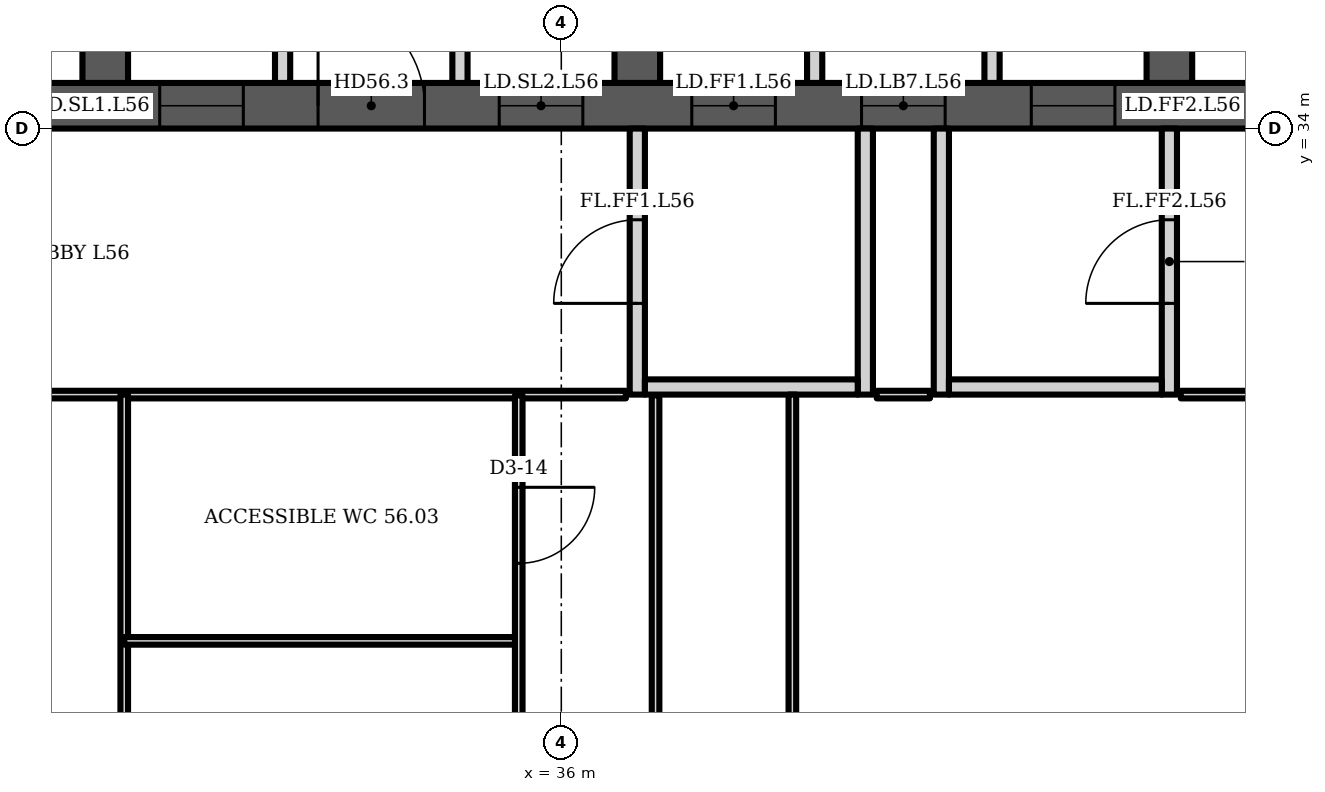
"""IFC4 building model, lengths in metres.
Left out: names, types, materials, properties, quantities, classifications, styles, units other than length and angle.
Written with IfcOpenShell. Run it as: python <this file> out.ifc"""

import sys

from ifc_helpers import new_model, si_unit, direction, frame, frame_2d, origin, place, context, subcontext, project, spatial, polyline, rectangle, outline, extrude, element, fill, save


model = new_model("IFC4")
c1 = context("Model", 3, precision=1e-05, world=origin(), true_north=direction((0.0, 1.0)))
c2 = subcontext(c1, "Body", "Model", "MODEL_VIEW")
j1 = project(units=[si_unit("LENGTHUNIT", "METRE"), si_unit("PLANEANGLEUNIT", "RADIAN")], contexts=[c1])
p1 = place(None, origin())
s1 = spatial("IfcSite", under=j1, at=p1, CompositionType="ELEMENT")
p2 = place(p1, origin())
s2 = spatial("IfcBuilding", under=s1, at=p2, CompositionType="ELEMENT")
p3 = place(p2, frame((0.0, 0.0, 225.1)))
s3 = spatial("IfcBuildingStorey", under=s2, at=p3, CompositionType="ELEMENT", Elevation=225.1)
p4 = place(p3, frame((23.0, 34.3, 0.0), z_axis=(0.0, 0.0, 1.0), x_axis=(1.0, 0.0, 0.0)))
e1 = element("IfcWall", 1, at=p4, inside=s3, PredefinedType="SHEAR", context=c2, shape_type="SweptSolid", body=[
    extrude(rectangle(XDim=35.0, YDim=0.6, at=frame_2d((17.5, 0.0))), origin(), (0.0, 0.0, 1.0), 3.6),
])
p5 = place(p4, frame((0.65, 0.0, 0.0)))
e2 = element("IfcOpeningElement", 2, at=p5, cuts=e1, PredefinedType="OPENING", context=c2, shape_type="SweptSolid", body=[
    extrude(rectangle(XDim=1.2, YDim=2.1, at=frame_2d((0.6, 1.05))), frame((0.0, 0.31, 0.0), z_axis=(0.0, -1.0, 0.0), x_axis=(1.0, 0.0, 0.0)), (0.0, 0.0, 1.0), 0.62),
])
p6 = place(p4, frame((7.717, 0.0, 0.0)))
e3 = element("IfcOpeningElement", 3, at=p6, cuts=e1, PredefinedType="OPENING", context=c2, shape_type="SweptSolid", body=[
    extrude(rectangle(XDim=1.1, YDim=2.1, at=frame_2d((0.55, 1.05))), frame((0.0, 0.31, 0.0), z_axis=(0.0, -1.0, 0.0), x_axis=(1.0, 0.0, 0.0)), (0.0, 0.0, 1.0), 0.62),
])
p7 = place(p4, frame((12.183, 0.0, 0.0)))
e4 = element("IfcOpeningElement", 4, at=p7, cuts=e1, PredefinedType="OPENING", context=c2, shape_type="SweptSolid", body=[
    extrude(rectangle(XDim=1.1, YDim=2.1, at=frame_2d((0.55, 1.05))), frame((0.0, 0.31, 0.0), z_axis=(0.0, -1.0, 0.0), x_axis=(1.0, 0.0, 0.0)), (0.0, 0.0, 1.0), 0.62),
])
p8 = place(p4, frame((9.8, 0.0, 0.0)))
e5 = element("IfcOpeningElement", 5, at=p8, cuts=e1, PredefinedType="OPENING", context=c2, shape_type="SweptSolid", body=[
    extrude(rectangle(XDim=1.4, YDim=2.1, at=frame_2d((0.7, 1.05))), frame((0.0, 0.31, 0.0), z_axis=(0.0, -1.0, 0.0), x_axis=(1.0, 0.0, 0.0)), (0.0, 0.0, 1.0), 0.62),
])
p9 = place(p4, frame((14.717, 0.0, 0.0)))
e6 = element("IfcOpeningElement", 6, at=p9, cuts=e1, PredefinedType="OPENING", context=c2, shape_type="SweptSolid", body=[
    extrude(rectangle(XDim=1.1, YDim=2.1, at=frame_2d((0.55, 1.05))), frame((0.0, 0.31, 0.0), z_axis=(0.0, -1.0, 0.0), x_axis=(1.0, 0.0, 0.0)), (0.0, 0.0, 1.0), 0.62),
])
p10 = place(p4, frame((16.95, 0.0, 0.0)))
e7 = element("IfcOpeningElement", 7, at=p10, cuts=e1, PredefinedType="OPENING", context=c2, shape_type="SweptSolid", body=[
    extrude(rectangle(XDim=1.1, YDim=2.1, at=frame_2d((0.55, 1.05))), frame((0.0, 0.31, 0.0), z_axis=(0.0, -1.0, 0.0), x_axis=(1.0, 0.0, 0.0)), (0.0, 0.0, 1.0), 0.62),
])
p11 = place(p4, frame((19.183, 0.0, 0.0)))
e8 = element("IfcOpeningElement", 8, at=p11, cuts=e1, PredefinedType="OPENING", context=c2, shape_type="SweptSolid", body=[
    extrude(rectangle(XDim=1.1, YDim=2.1, at=frame_2d((0.55, 1.05))), frame((0.0, 0.31, 0.0), z_axis=(0.0, -1.0, 0.0), x_axis=(1.0, 0.0, 0.0)), (0.0, 0.0, 1.0), 0.62),
])
p12 = place(p4, frame((26.15, 0.0, 0.0)))
e9 = element("IfcOpeningElement", 9, at=p12, cuts=e1, PredefinedType="OPENING", context=c2, shape_type="SweptSolid", body=[
    extrude(rectangle(XDim=1.2, YDim=2.1, at=frame_2d((0.6, 1.05))), frame((0.0, 0.31, 0.0), z_axis=(0.0, -1.0, 0.0), x_axis=(1.0, 0.0, 0.0)), (0.0, 0.0, 1.0), 0.62),
])
p13 = place(p4, frame((30.8, 0.0, 0.0)))
e10 = element("IfcOpeningElement", 10, at=p13, cuts=e1, PredefinedType="OPENING", context=c2, shape_type="SweptSolid", body=[
    extrude(rectangle(XDim=1.4, YDim=2.1, at=frame_2d((0.7, 1.05))), frame((0.0, 0.31, 0.0), z_axis=(0.0, -1.0, 0.0), x_axis=(1.0, 0.0, 0.0)), (0.0, 0.0, 1.0), 0.62),
])
p14 = place(p3, frame((30.0, 34.6, 0.0), z_axis=(0.0, 0.0, 1.0), x_axis=(0.0, 1.0, 0.0)))
e11 = element("IfcWall", 11, at=p14, inside=s3, PredefinedType="SHEAR", context=c2, shape_type="SweptSolid", body=[
    extrude(rectangle(XDim=14.171, YDim=0.6, at=frame_2d((7.085, 0.0))), origin(), (0.0, 0.0, 1.0), 3.6),
])
p15 = place(p14, frame((3.8, 0.0, 0.0)))
e12 = element("IfcOpeningElement", 12, at=p15, cuts=e11, PredefinedType="OPENING", context=c2, shape_type="SweptSolid", body=[
    extrude(rectangle(XDim=1.1, YDim=2.1, at=frame_2d((0.55, 1.05))), frame((0.0, 0.31, 0.0), z_axis=(0.0, -1.0, 0.0), x_axis=(1.0, 0.0, 0.0)), (0.0, 0.0, 1.0), 0.62),
])
p16 = place(p3, frame((37.0, 34.6, 0.0), z_axis=(0.0, 0.0, 1.0), x_axis=(0.0, 1.0, 0.0)))
e13 = element("IfcWall", 13, at=p16, inside=s3, PredefinedType="SHEAR", context=c2, shape_type="SweptSolid", body=[
    extrude(rectangle(XDim=14.784, YDim=0.6, at=frame_2d((7.392, 0.0))), origin(), (0.0, 0.0, 1.0), 3.6),
])
p17 = place(p16, frame((11.302, 0.0, 0.0)))
e14 = element("IfcOpeningElement", 14, at=p17, cuts=e13, PredefinedType="OPENING", context=c2, shape_type="SweptSolid", body=[
    extrude(rectangle(XDim=1.0, YDim=2.1, at=frame_2d((0.5, 1.05))), frame((0.0, 0.31, 0.0), z_axis=(0.0, -1.0, 0.0), x_axis=(1.0, 0.0, 0.0)), (0.0, 0.0, 1.0), 0.62),
])
p18 = place(p16, frame((3.8, 0.0, 0.0)))
e15 = element("IfcOpeningElement", 15, at=p18, cuts=e13, PredefinedType="OPENING", context=c2, shape_type="SweptSolid", body=[
    extrude(rectangle(XDim=1.1, YDim=2.1, at=frame_2d((0.55, 1.05))), frame((0.0, 0.31, 0.0), z_axis=(0.0, -1.0, 0.0), x_axis=(1.0, 0.0, 0.0)), (0.0, 0.0, 1.0), 0.62),
])
p19 = place(p3, frame((44.0, 34.6, 0.0), z_axis=(0.0, 0.0, 1.0), x_axis=(0.0, 1.0, 0.0)))
e16 = element("IfcWall", 16, at=p19, inside=s3, PredefinedType="SHEAR", context=c2, shape_type="SweptSolid", body=[
    extrude(rectangle(XDim=14.784, YDim=0.6, at=frame_2d((7.392, 0.0))), origin(), (0.0, 0.0, 1.0), 3.6),
])
p20 = place(p19, frame((11.608, 0.0, 0.0)))
e17 = element("IfcOpeningElement", 17, at=p20, cuts=e16, PredefinedType="OPENING", context=c2, shape_type="SweptSolid", body=[
    extrude(rectangle(XDim=1.0, YDim=2.1, at=frame_2d((0.5, 1.05))), frame((0.0, 0.31, 0.0), z_axis=(0.0, -1.0, 0.0), x_axis=(1.0, 0.0, 0.0)), (0.0, 0.0, 1.0), 0.62),
])
p21 = place(p19, frame((3.8, 0.0, 0.0)))
e18 = element("IfcOpeningElement", 18, at=p21, cuts=e16, PredefinedType="OPENING", context=c2, shape_type="SweptSolid", body=[
    extrude(rectangle(XDim=1.1, YDim=2.1, at=frame_2d((0.55, 1.05))), frame((0.0, 0.31, 0.0), z_axis=(0.0, -1.0, 0.0), x_axis=(1.0, 0.0, 0.0)), (0.0, 0.0, 1.0), 0.62),
])
p22 = place(p3, frame((0.0, 0.0, -0.0)))
e19 = element("IfcWall", 19, at=p22, inside=s3, PredefinedType="PARTITIONING", context=c2, shape_type="SweptSolid", body=[
    extrude(outline(polyline([(32.233, 37.45), (30.3, 37.45), (30.3, 37.65), (32.233, 37.65), (32.433, 37.65), (32.433, 34.6), (32.233, 34.6), (32.233, 37.45)])), origin(), (0.0, 0.0, 1.0), 3.2),
])
p23 = place(p3, frame((0.0, 0.0, -0.0)))
e20 = element("IfcWall", 20, at=p23, inside=s3, PredefinedType="PARTITIONING", context=c2, shape_type="SweptSolid", body=[
    extrude(outline(polyline([(34.567, 37.65), (34.767, 37.65), (36.7, 37.65), (36.7, 37.45), (34.767, 37.45), (34.767, 34.6), (34.567, 34.6), (34.567, 37.65)])), origin(), (0.0, 0.0, 1.0), 3.2),
])
p24 = place(p3, frame((0.0, 0.0, -0.0)))
e21 = element("IfcWall", 21, at=p24, inside=s3, PredefinedType="PARTITIONING", context=c2, shape_type="SweptSolid", body=[
    extrude(outline(polyline([(41.567, 37.1), (39.433, 37.1), (39.433, 34.6), (39.233, 34.6), (39.233, 37.45), (37.3, 37.45), (37.3, 37.65), (39.233, 37.65), (39.433, 37.65), (39.433, 37.3), (41.567, 37.3), (41.567, 37.35), (41.767, 37.35), (43.7, 37.35), (43.7, 37.15), (41.767, 37.15), (41.767, 34.6), (41.567, 34.6), (41.567, 37.1)])), origin(), (0.0, 0.0, 1.0), 3.2),
])
p25 = place(p3, frame((37.0, 30.5, 0.0), z_axis=(0.0, 0.0, 1.0), x_axis=(0.0, 1.0, 0.0)))
e22 = element("IfcWall", 22, at=p25, inside=s3, PredefinedType="PARTITIONING", context=c2, shape_type="SweptSolid", body=[
    extrude(rectangle(XDim=3.5, YDim=0.2, at=frame_2d((1.75, 0.0))), origin(), (0.0, 0.0, 1.0), 3.2),
])
p26 = place(p25, frame((1.2, 0.0, 0.0)))
e23 = element("IfcOpeningElement", 23, at=p26, cuts=e22, PredefinedType="OPENING", context=c2, shape_type="SweptSolid", body=[
    extrude(rectangle(XDim=1.1, YDim=2.1, at=frame_2d((0.55, 1.05))), frame((0.0, 0.11, 0.0), z_axis=(0.0, -1.0, 0.0), x_axis=(1.0, 0.0, 0.0)), (0.0, 0.0, 1.0), 0.22),
])
p27 = place(p3, frame((40.0, 30.5, 0.0), z_axis=(0.0, 0.0, 1.0), x_axis=(0.0, 1.0, 0.0)))
e24 = element("IfcWall", 24, at=p27, inside=s3, PredefinedType="PARTITIONING", context=c2, shape_type="SweptSolid", body=[
    extrude(rectangle(XDim=3.5, YDim=0.2, at=frame_2d((1.75, 0.0))), origin(), (0.0, 0.0, 1.0), 3.2),
])
p28 = place(p3, frame((37.1, 30.6, 0.0), z_axis=(0.0, 0.0, 1.0), x_axis=(1.0, 0.0, 0.0)))
e25 = element("IfcWall", 25, at=p28, inside=s3, PredefinedType="PARTITIONING", context=c2, shape_type="SweptSolid", body=[
    extrude(rectangle(XDim=2.8, YDim=0.2, at=frame_2d((1.4, 0.0))), origin(), (0.0, 0.0, 1.0), 3.2),
])
p29 = place(p3, frame((41.0, 30.5, 0.0), z_axis=(0.0, 0.0, 1.0), x_axis=(0.0, 1.0, 0.0)))
e26 = element("IfcWall", 26, at=p29, inside=s3, PredefinedType="PARTITIONING", context=c2, shape_type="SweptSolid", body=[
    extrude(rectangle(XDim=3.5, YDim=0.2, at=frame_2d((1.75, 0.0))), origin(), (0.0, 0.0, 1.0), 3.2),
])
p30 = place(p3, frame((44.0, 30.5, 0.0), z_axis=(0.0, 0.0, 1.0), x_axis=(0.0, 1.0, 0.0)))
e27 = element("IfcWall", 27, at=p30, inside=s3, PredefinedType="PARTITIONING", context=c2, shape_type="SweptSolid", body=[
    extrude(rectangle(XDim=3.5, YDim=0.2, at=frame_2d((1.75, 0.0))), origin(), (0.0, 0.0, 1.0), 3.2),
])
p31 = place(p30, frame((1.2, 0.0, 0.0)))
e28 = element("IfcOpeningElement", 28, at=p31, cuts=e27, PredefinedType="OPENING", context=c2, shape_type="SweptSolid", body=[
    extrude(rectangle(XDim=1.1, YDim=2.1, at=frame_2d((0.55, 1.05))), frame((0.0, 0.11, 0.0), z_axis=(0.0, -1.0, 0.0), x_axis=(1.0, 0.0, 0.0)), (0.0, 0.0, 1.0), 0.22),
])
p32 = place(p3, frame((41.1, 30.6, 0.0), z_axis=(0.0, 0.0, 1.0), x_axis=(1.0, 0.0, 0.0)))
e29 = element("IfcWall", 29, at=p32, inside=s3, PredefinedType="PARTITIONING", context=c2, shape_type="SweptSolid", body=[
    extrude(rectangle(XDim=2.8, YDim=0.2, at=frame_2d((1.4, 0.0))), origin(), (0.0, 0.0, 1.0), 3.2),
])
p33 = place(p3, frame((24.8, 30.5, 0.0), z_axis=(0.0, 0.0, 1.0), x_axis=(1.0, 0.0, 0.0)))
e30 = element("IfcWall", 30, at=p33, inside=s3, PredefinedType="PARTITIONING", context=c2, shape_type="SweptSolid", body=[
    extrude(rectangle(XDim=12.05, YDim=0.1, at=frame_2d((6.025, 0.0))), origin(), (0.0, 0.0, 1.0), 3.2),
])
p34 = place(p3, frame((30.25, 17.0, 0.0), z_axis=(0.0, 0.0, 1.0), x_axis=(0.0, 1.0, 0.0)))
e31 = element("IfcWall", 31, at=p34, inside=s3, PredefinedType="PARTITIONING", context=c2, shape_type="SweptSolid", body=[
    extrude(rectangle(XDim=13.5, YDim=0.1, at=frame_2d((6.75, 0.0))), origin(), (0.0, 0.0, 1.0), 3.2),
])
p35 = place(p3, frame((30.25, 27.26, 0.0), z_axis=(0.0, 0.0, 1.0), x_axis=(1.0, 0.0, 0.0)))
e32 = element("IfcWall", 32, at=p35, inside=s3, PredefinedType="PARTITIONING", context=c2, shape_type="SweptSolid", body=[
    extrude(rectangle(XDim=5.19, YDim=0.1, at=frame_2d((2.595, 0.0))), origin(), (0.0, 0.0, 1.0), 3.2),
])
p36 = place(p3, frame((35.44, 16.995, 0.0), z_axis=(0.0, 0.0, 1.0), x_axis=(0.0, 1.0, 0.0)))
e33 = element("IfcWall", 33, at=p36, inside=s3, PredefinedType="PARTITIONING", context=c2, shape_type="SweptSolid", body=[
    extrude(rectangle(XDim=13.495, YDim=0.1, at=frame_2d((6.748, 0.0))), origin(), (0.0, 0.0, 1.0), 3.2),
])
p37 = place(p36, frame((2.166, 0.0, 0.0)))
e34 = element("IfcOpeningElement", 34, at=p37, cuts=e33, PredefinedType="OPENING", context=c2, shape_type="SweptSolid", body=[
    extrude(rectangle(XDim=0.9, YDim=2.1, at=frame_2d((0.45, 1.05))), frame((0.0, 0.06, 0.0), z_axis=(0.0, -1.0, 0.0), x_axis=(1.0, 0.0, 0.0)), (0.0, 0.0, 1.0), 0.12),
])
p38 = place(p36, frame((7.215, 0.0, 0.0)))
e35 = element("IfcOpeningElement", 35, at=p38, cuts=e33, PredefinedType="OPENING", context=c2, shape_type="SweptSolid", body=[
    extrude(rectangle(XDim=0.9, YDim=2.1, at=frame_2d((0.45, 1.05))), frame((0.0, 0.06, 0.0), z_axis=(0.0, -1.0, 0.0), x_axis=(1.0, 0.0, 0.0)), (0.0, 0.0, 1.0), 0.12),
])
p39 = place(p36, frame((11.285, 0.0, 0.0)))
e36 = element("IfcOpeningElement", 36, at=p39, cuts=e33, PredefinedType="OPENING", context=c2, shape_type="SweptSolid", body=[
    extrude(rectangle(XDim=1.0, YDim=2.1, at=frame_2d((0.5, 1.05))), frame((0.0, 0.06, 0.0), z_axis=(0.0, -1.0, 0.0), x_axis=(1.0, 0.0, 0.0)), (0.0, 0.0, 1.0), 0.12),
])
p40 = place(p3, frame((37.24, 4.587, 0.0), z_axis=(0.0, 0.0, 1.0), x_axis=(0.0, 1.0, 0.0)))
e37 = element("IfcWall", 37, at=p40, inside=s3, PredefinedType="PARTITIONING", context=c2, shape_type="SweptSolid", body=[
    extrude(rectangle(XDim=25.903, YDim=0.1, at=frame_2d((12.952, 0.0))), origin(), (0.0, 0.0, 1.0), 2.58),
])
p41 = place(p40, frame((11.802, 0.0, 0.0)))
e38 = element("IfcOpeningElement", 38, at=p41, cuts=e37, PredefinedType="OPENING", context=c2, shape_type="SweptSolid", body=[
    extrude(rectangle(XDim=1.0, YDim=2.1, at=frame_2d((0.5, 1.05))), frame((0.0, 0.06, 0.0), z_axis=(0.0, -1.0, 0.0), x_axis=(1.0, 0.0, 0.0)), (0.0, 0.0, 1.0), 0.12),
])
p42 = place(p3, frame((39.04, 15.245, 0.0), z_axis=(0.0, 0.0, 1.0), x_axis=(0.0, 1.0, 0.0)))
e39 = element("IfcWall", 39, at=p42, inside=s3, PredefinedType="PARTITIONING", context=c2, shape_type="SweptSolid", body=[
    extrude(rectangle(XDim=15.255, YDim=0.1, at=frame_2d((7.627, 0.0))), origin(), (0.0, 0.0, 1.0), 3.2),
])
p43 = place(p42, frame((3.575, 0.0, 0.0)))
e40 = element("IfcOpeningElement", 40, at=p43, cuts=e39, PredefinedType="OPENING", context=c2, shape_type="SweptSolid", body=[
    extrude(rectangle(XDim=1.0, YDim=2.1, at=frame_2d((0.5, 1.05))), frame((0.0, 0.06, 0.0), z_axis=(0.0, -1.0, 0.0), x_axis=(1.0, 0.0, 0.0)), (0.0, 0.0, 1.0), 0.12),
])
p44 = place(p42, frame((8.075, 0.0, 0.0)))
e41 = element("IfcOpeningElement", 41, at=p44, cuts=e39, PredefinedType="OPENING", context=c2, shape_type="SweptSolid", body=[
    extrude(rectangle(XDim=1.0, YDim=2.1, at=frame_2d((0.5, 1.05))), frame((0.0, 0.06, 0.0), z_axis=(0.0, -1.0, 0.0), x_axis=(1.0, 0.0, 0.0)), (0.0, 0.0, 1.0), 0.12),
])
p45 = place(p3, frame((40.15, 30.5, 0.0), z_axis=(0.0, 0.0, 1.0), x_axis=(1.0, 0.0, 0.0)))
e42 = element("IfcWall", 42, at=p45, inside=s3, PredefinedType="PARTITIONING", context=c2, shape_type="SweptSolid", body=[
    extrude(rectangle(XDim=0.7, YDim=0.1, at=frame_2d((0.35, 0.0))), origin(), (0.0, 0.0, 1.0), 3.2),
])
p46 = place(p3, frame((44.15, 30.5, 0.0), z_axis=(0.0, 0.0, 1.0), x_axis=(1.0, 0.0, 0.0)))
e43 = element("IfcWall", 43, at=p46, inside=s3, PredefinedType="PARTITIONING", context=c2, shape_type="SweptSolid", body=[
    extrude(rectangle(XDim=13.85, YDim=0.1, at=frame_2d((6.925, 0.0))), origin(), (0.0, 0.0, 1.0), 3.2),
])
p47 = place(p46, frame((6.77, 0.0, 0.0)))
e44 = element("IfcOpeningElement", 44, at=p47, cuts=e43, PredefinedType="OPENING", context=c2, shape_type="SweptSolid", body=[
    extrude(rectangle(XDim=1.0, YDim=2.1, at=frame_2d((0.5, 1.05))), frame((0.0, 0.06, 0.0), z_axis=(0.0, -1.0, 0.0), x_axis=(1.0, 0.0, 0.0)), (0.0, 0.0, 1.0), 0.12),
])
p48 = place(p6, origin())
e45 = element("IfcDoor", 45, at=p48, inside=s3, OperationType="DOUBLE_DOOR_SLIDING", PredefinedType="DOOR", context=c2, shape_type="SweptSolid", body=[
    extrude(rectangle(XDim=1.1, YDim=2.1, at=frame_2d((0.55, 1.05))), frame((0.0, 0.025, 0.0), z_axis=(0.0, -1.0, 0.0), x_axis=(1.0, 0.0, 0.0)), (0.0, 0.0, 1.0), 0.05),
])
fill(e3, e45)
p49 = place(p7, origin())
e46 = element("IfcDoor", 46, at=p49, inside=s3, OperationType="DOUBLE_DOOR_SLIDING", PredefinedType="DOOR", context=c2, shape_type="SweptSolid", body=[
    extrude(rectangle(XDim=1.1, YDim=2.1, at=frame_2d((0.55, 1.05))), frame((0.0, 0.025, 0.0), z_axis=(0.0, -1.0, 0.0), x_axis=(1.0, 0.0, 0.0)), (0.0, 0.0, 1.0), 0.05),
])
fill(e4, e46)
p50 = place(p8, origin())
e47 = element("IfcDoor", 47, at=p50, inside=s3, OperationType="DOUBLE_DOOR_SINGLE_SWING", PredefinedType="DOOR", context=c2, shape_type="SweptSolid", body=[
    extrude(rectangle(XDim=1.4, YDim=2.1, at=frame_2d((0.7, 1.05))), frame((0.0, 0.025, 0.0), z_axis=(0.0, -1.0, 0.0), x_axis=(1.0, 0.0, 0.0)), (0.0, 0.0, 1.0), 0.05),
])
fill(e5, e47)
p51 = place(p9, origin())
e48 = element("IfcDoor", 48, at=p51, inside=s3, OperationType="DOUBLE_DOOR_SLIDING", PredefinedType="DOOR", context=c2, shape_type="SweptSolid", body=[
    extrude(rectangle(XDim=1.1, YDim=2.1, at=frame_2d((0.55, 1.05))), frame((0.0, 0.025, 0.0), z_axis=(0.0, -1.0, 0.0), x_axis=(1.0, 0.0, 0.0)), (0.0, 0.0, 1.0), 0.05),
])
fill(e6, e48)
p52 = place(p10, origin())
e49 = element("IfcDoor", 49, at=p52, inside=s3, OperationType="DOUBLE_DOOR_SLIDING", PredefinedType="DOOR", context=c2, shape_type="SweptSolid", body=[
    extrude(rectangle(XDim=1.1, YDim=2.1, at=frame_2d((0.55, 1.05))), frame((0.0, 0.025, 0.0), z_axis=(0.0, -1.0, 0.0), x_axis=(1.0, 0.0, 0.0)), (0.0, 0.0, 1.0), 0.05),
])
fill(e7, e49)
p53 = place(p11, origin())
e50 = element("IfcDoor", 50, at=p53, inside=s3, OperationType="DOUBLE_DOOR_SLIDING", PredefinedType="DOOR", context=c2, shape_type="SweptSolid", body=[
    extrude(rectangle(XDim=1.1, YDim=2.1, at=frame_2d((0.55, 1.05))), frame((0.0, 0.025, 0.0), z_axis=(0.0, -1.0, 0.0), x_axis=(1.0, 0.0, 0.0)), (0.0, 0.0, 1.0), 0.05),
])
fill(e8, e50)
p54 = place(p26, origin())
e51 = element("IfcDoor", 51, at=p54, inside=s3, OperationType="SINGLE_SWING_LEFT", PredefinedType="DOOR", context=c2, shape_type="SweptSolid", body=[
    extrude(rectangle(XDim=1.1, YDim=2.1, at=frame_2d((0.55, 1.05))), frame((0.0, 0.025, 0.0), z_axis=(0.0, -1.0, 0.0), x_axis=(1.0, 0.0, 0.0)), (0.0, 0.0, 1.0), 0.05),
])
fill(e23, e51)
p55 = place(p31, origin())
e52 = element("IfcDoor", 52, at=p55, inside=s3, OperationType="SINGLE_SWING_LEFT", PredefinedType="DOOR", context=c2, shape_type="SweptSolid", body=[
    extrude(rectangle(XDim=1.1, YDim=2.1, at=frame_2d((0.55, 1.05))), frame((0.0, 0.025, 0.0), z_axis=(0.0, -1.0, 0.0), x_axis=(1.0, 0.0, 0.0)), (0.0, 0.0, 1.0), 0.05),
])
fill(e28, e52)
p56 = place(p39, origin())
e53 = element("IfcDoor", 53, at=p56, inside=s3, OperationType="SINGLE_SWING_RIGHT", PredefinedType="DOOR", context=c2, shape_type="SweptSolid", body=[
    extrude(rectangle(XDim=1.0, YDim=2.1, at=frame_2d((0.5, 1.05))), frame((0.0, 0.025, 0.0), z_axis=(0.0, -1.0, 0.0), x_axis=(1.0, 0.0, 0.0)), (0.0, 0.0, 1.0), 0.05),
])
fill(e36, e53)
save(model, sys.argv[1])
